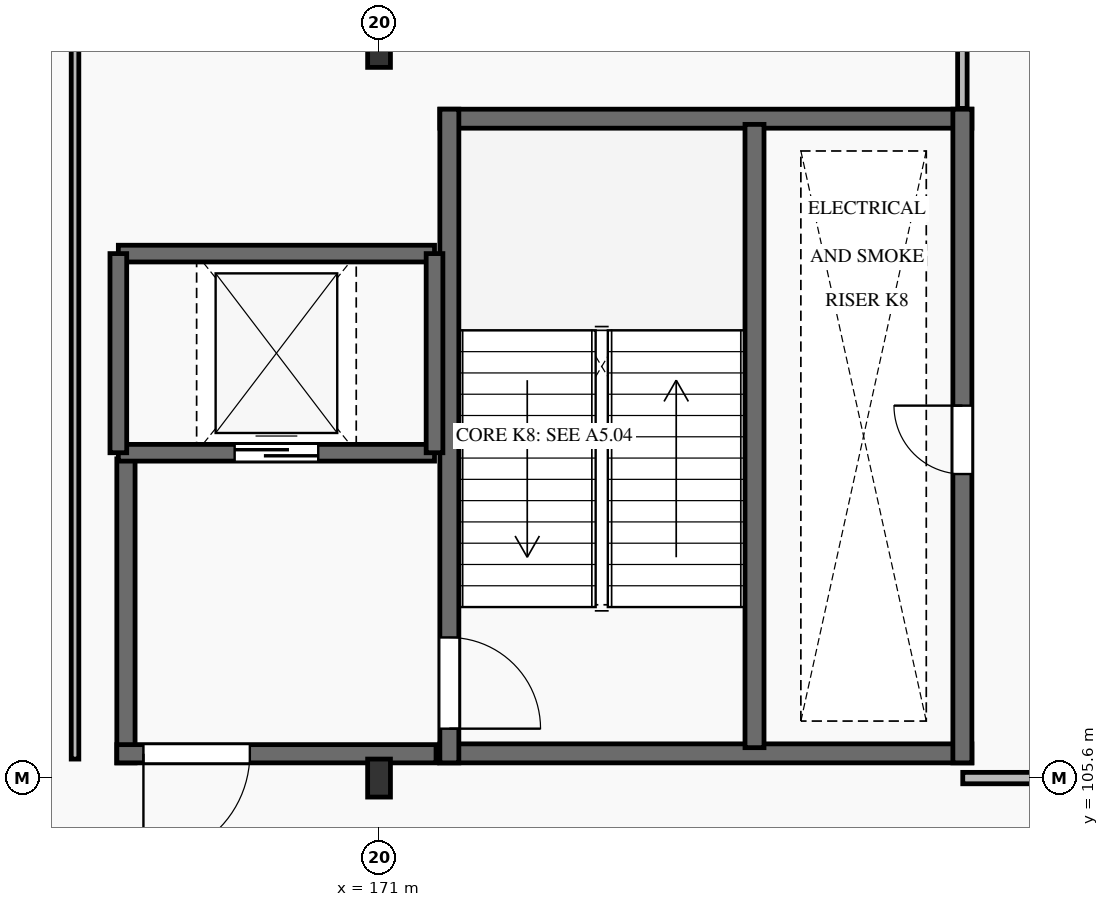
"""IFC4 building model, lengths in metres.
Left out: names, types, materials, properties, quantities, classifications, styles, units other than length and angle.
Written with IfcOpenShell. Run it as: python <this file> out.ifc"""

import sys

from ifc_helpers import new_model, si_unit, direction, frame, frame_2d, origin, origin_2d, place, context, subcontext, project, spatial, rectangle, i_section, extrude, element, fill, save


model = new_model("IFC4")
c1 = context("Model", 3, precision=1e-05, world=origin(), true_north=direction((0.0, 1.0)))
c2 = subcontext(c1, "Body", "Model", "MODEL_VIEW")
j1 = project(units=[si_unit("LENGTHUNIT", "METRE"), si_unit("PLANEANGLEUNIT", "RADIAN")], contexts=[c1])
p1 = place(None, origin())
s1 = spatial("IfcSite", under=j1, at=p1, CompositionType="ELEMENT")
p2 = place(p1, origin())
s2 = spatial("IfcBuilding", under=s1, at=p2, CompositionType="ELEMENT")
p3 = place(p2, frame((0.0, 0.0, 6.0)))
s3 = spatial("IfcBuildingStorey", under=s2, at=p3, CompositionType="ELEMENT", Elevation=6.0)
for number, where, z_axis, x_axis in (
    (1, (171.0, 105.6, 0.0), (0.0, 0.0, 1.0), (1.0, 0.0, 0.0)),
    (2, (171.0, 115.2, 0.0), (0.0, 0.0, 1.0), (1.0, 0.0, 0.0)),
):
    element("IfcColumn", number, at=place(p3, frame(where, z_axis=z_axis, x_axis=x_axis)), inside=s3, PredefinedType="COLUMN", context=c2, shape_type="SweptSolid", body=[
        extrude(i_section(OverallWidth=0.3, OverallDepth=0.5, WebThickness=0.014, FlangeThickness=0.028, FilletRadius=0.027, at=origin_2d()), origin(), (0.0, 0.0, 1.0), 4.8),
    ])
for number, where, z_axis, x_axis in (
    (3, (171.8, 105.925, 0.0), (0.0, 0.0, 1.0), (1.0, 0.0, 0.0)),
    (4, (171.8, 114.275, 0.0), (0.0, 0.0, 1.0), (1.0, 0.0, 0.0)),
):
    element("IfcWall", number, at=place(p3, frame(where, z_axis=z_axis, x_axis=x_axis)), inside=s3, PredefinedType="SHEAR", context=c2, shape_type="SweptSolid", body=[
        extrude(rectangle(XDim=7.0, YDim=0.25, at=frame_2d((3.5, 0.0))), origin(), (0.0, 0.0, 1.0), 4.8),
    ])
p4 = place(p3, frame((171.925, 105.8, 0.0), z_axis=(0.0, 0.0, 1.0), x_axis=(0.0, 1.0, 0.0)))
e5 = element("IfcWall", 5, at=p4, inside=s3, PredefinedType="SHEAR", context=c2, shape_type="SweptSolid", body=[
    extrude(rectangle(XDim=8.6, YDim=0.25, at=frame_2d((4.3, 0.0))), origin(), (0.0, 0.0, 1.0), 4.8),
])
p5 = place(p4, frame((0.45, 0.0, 0.0)))
e6 = element("IfcOpeningElement", 6, at=p5, cuts=e5, PredefinedType="OPENING", context=c2, shape_type="SweptSolid", body=[
    extrude(rectangle(XDim=1.2, YDim=2.15, at=frame_2d((0.6, 1.075))), frame((0.0, 0.14, 0.0), z_axis=(0.0, -1.0, 0.0), x_axis=(1.0, 0.0, 0.0)), (0.0, 0.0, 1.0), 0.28),
])
p6 = place(p3, frame((178.675, 105.8, 0.0), z_axis=(0.0, 0.0, 1.0), x_axis=(0.0, 1.0, 0.0)))
e7 = element("IfcWall", 7, at=p6, inside=s3, PredefinedType="SHEAR", context=c2, shape_type="SweptSolid", body=[
    extrude(rectangle(XDim=8.6, YDim=0.25, at=frame_2d((4.3, 0.0))), origin(), (0.0, 0.0, 1.0), 4.8),
])
p7 = place(p6, frame((3.8, 0.0, 0.0)))
e8 = element("IfcOpeningElement", 8, at=p7, cuts=e7, PredefinedType="OPENING", context=c2, shape_type="SweptSolid", body=[
    extrude(rectangle(XDim=0.9, YDim=2.05, at=frame_2d((0.45, 1.025))), frame((0.0, 0.14, 0.0), z_axis=(0.0, -1.0, 0.0), x_axis=(1.0, 0.0, 0.0)), (0.0, 0.0, 1.0), 0.28),
])
p8 = place(p3, frame((175.94, 106.0, 0.0), z_axis=(0.0, 0.0, 1.0), x_axis=(0.0, 1.0, 0.0)))
e9 = element("IfcWall", 9, at=p8, inside=s3, PredefinedType="SHEAR", context=c2, shape_type="SweptSolid", body=[
    extrude(rectangle(XDim=8.2, YDim=0.25, at=frame_2d((4.1, 0.0))), origin(), (0.0, 0.0, 1.0), 4.8),
])
p9 = place(p3, frame((167.67, 105.8, 0.0), z_axis=(0.0, 0.0, 1.0), x_axis=(0.0, 1.0, 0.0)))
e10 = element("IfcWall", 10, at=p9, inside=s3, PredefinedType="SHEAR", context=c2, shape_type="SweptSolid", body=[
    extrude(rectangle(XDim=4.0, YDim=0.24, at=frame_2d((2.0, 0.0))), origin(), (0.0, 0.0, 1.0), 4.8),
])
p10 = place(p3, frame((167.55, 105.92, 0.0), z_axis=(0.0, 0.0, 1.0), x_axis=(1.0, 0.0, 0.0)))
e11 = element("IfcWall", 11, at=p10, inside=s3, PredefinedType="SHEAR", context=c2, shape_type="SweptSolid", body=[
    extrude(rectangle(XDim=4.2, YDim=0.24, at=frame_2d((2.1, 0.0))), origin(), (0.0, 0.0, 1.0), 4.8),
])
p11 = place(p10, frame((0.35, 0.0, 0.0)))
e12 = element("IfcOpeningElement", 12, at=p11, cuts=e11, PredefinedType="OPENING", context=c2, shape_type="SweptSolid", body=[
    extrude(rectangle(XDim=1.4, YDim=2.2, at=frame_2d((0.7, 1.1))), frame((0.0, 0.135, 0.0), z_axis=(0.0, -1.0, 0.0), x_axis=(1.0, 0.0, 0.0)), (0.0, 0.0, 1.0), 0.27),
])
p12 = place(p3, frame((167.57, 109.88, 0.0), z_axis=(0.0, 0.0, 1.0), x_axis=(1.0, 0.0, 0.0)))
e13 = element("IfcWall", 13, at=p12, inside=s3, PredefinedType="SHEAR", context=c2, shape_type="SweptSolid", body=[
    extrude(rectangle(XDim=4.16, YDim=0.22, at=frame_2d((2.08, 0.0))), origin(), (0.0, 0.0, 1.0), 4.8),
])
p13 = place(p12, frame((1.53, 0.0, 0.0)))
e14 = element("IfcOpeningElement", 14, at=p13, cuts=e13, PredefinedType="OPENING", context=c2, shape_type="SweptSolid", body=[
    extrude(rectangle(XDim=1.1, YDim=2.15, at=frame_2d((0.55, 1.075))), frame((0.0, 0.125, 0.0), z_axis=(0.0, -1.0, 0.0), x_axis=(1.0, 0.0, 0.0)), (0.0, 0.0, 1.0), 0.25),
])
p14 = place(p3, frame((167.57, 112.5, 0.0), z_axis=(0.0, 0.0, 1.0), x_axis=(1.0, 0.0, 0.0)))
e15 = element("IfcWall", 15, at=p14, inside=s3, PredefinedType="SHEAR", context=c2, shape_type="SweptSolid", body=[
    extrude(rectangle(XDim=4.16, YDim=0.22, at=frame_2d((2.08, 0.0))), origin(), (0.0, 0.0, 1.0), 4.8),
])
for number, where, z_axis, x_axis in (
    (16, (167.57, 109.88, 0.0), (0.0, 0.0, 1.0), (0.0, 1.0, 0.0)),
    (17, (171.73, 109.88, 0.0), (0.0, 0.0, 1.0), (0.0, 1.0, 0.0)),
):
    element("IfcWall", number, at=place(p3, frame(where, z_axis=z_axis, x_axis=x_axis)), inside=s3, PredefinedType="SHEAR", context=c2, shape_type="SweptSolid", body=[
        extrude(rectangle(XDim=2.62, YDim=0.22, at=frame_2d((1.31, 0.0))), origin(), (0.0, 0.0, 1.0), 4.8),
    ])
p15 = place(p3, frame((178.68, 105.6, 0.0), z_axis=(0.0, 0.0, 1.0), x_axis=(1.0, 0.0, 0.0)))
e18 = element("IfcWall", 18, at=p15, inside=s3, PredefinedType="PARTITIONING", context=c2, shape_type="SweptSolid", body=[
    extrude(rectangle(XDim=10.165, YDim=0.15, at=frame_2d((5.083, 0.0))), origin(), (0.0, 0.0, 1.0), 4.23),
])
p16 = place(p15, frame((4.645, 0.0, 0.0)))
e19 = element("IfcOpeningElement", 19, at=p16, cuts=e18, PredefinedType="OPENING", context=c2, shape_type="SweptSolid", body=[
    extrude(rectangle(XDim=0.95, YDim=2.1, at=frame_2d((0.475, 1.05))), frame((0.0, 0.09, 0.0), z_axis=(0.0, -1.0, 0.0), x_axis=(1.0, 0.0, 0.0)), (0.0, 0.0, 1.0), 0.18),
])
p17 = place(p3, frame((167.0, 105.85, 0.0), z_axis=(0.0, 0.0, 1.0), x_axis=(0.0, 1.0, 0.0)))
e20 = element("IfcWall", 20, at=p17, inside=s3, PredefinedType="PARTITIONING", context=c2, shape_type="SweptSolid", body=[
    extrude(rectangle(XDim=18.565, YDim=0.1, at=frame_2d((9.282, 0.0))), origin(), (0.0, 0.0, 1.0), 4.53),
])
p18 = place(p3, frame((178.675, 114.41, 0.0), z_axis=(0.0, 0.0, 1.0), x_axis=(0.0, 1.0, 0.0)))
e21 = element("IfcWall", 21, at=p18, inside=s3, PredefinedType="PARTITIONING", context=c2, shape_type="SweptSolid", body=[
    extrude(rectangle(XDim=10.0, YDim=0.125, at=frame_2d((5.0, 0.0))), origin(), (0.0, 0.0, 1.0), 4.53),
])
p19 = place(p5, frame((1.2, 0.0, 0.0), z_axis=(0.0, 0.0, 1.0), x_axis=(-1.0, 0.0, 0.0)))
e22 = element("IfcDoor", 22, at=p19, inside=s3, OperationType="SINGLE_SWING_LEFT", PredefinedType="DOOR", context=c2, shape_type="SweptSolid", body=[
    extrude(rectangle(XDim=1.2, YDim=2.15, at=frame_2d((0.6, 1.075))), frame((0.0, 0.025, 0.0), z_axis=(0.0, -1.0, 0.0), x_axis=(1.0, 0.0, 0.0)), (0.0, 0.0, 1.0), 0.05),
])
fill(e6, e22)
p20 = place(p7, origin())
e23 = element("IfcDoor", 23, at=p20, inside=s3, OperationType="SINGLE_SWING_RIGHT", PredefinedType="DOOR", context=c2, shape_type="SweptSolid", body=[
    extrude(rectangle(XDim=0.9, YDim=2.05, at=frame_2d((0.45, 1.025))), frame((0.0, 0.025, 0.0), z_axis=(0.0, -1.0, 0.0), x_axis=(1.0, 0.0, 0.0)), (0.0, 0.0, 1.0), 0.05),
])
fill(e8, e23)
p21 = place(p11, frame((1.4, 0.0, 0.0), z_axis=(0.0, 0.0, 1.0), x_axis=(-1.0, 0.0, 0.0)))
e24 = element("IfcDoor", 24, at=p21, inside=s3, OperationType="SINGLE_SWING_LEFT", PredefinedType="DOOR", context=c2, shape_type="SweptSolid", body=[
    extrude(rectangle(XDim=1.4, YDim=2.2, at=frame_2d((0.7, 1.1))), frame((0.0, 0.025, 0.0), z_axis=(0.0, -1.0, 0.0), x_axis=(1.0, 0.0, 0.0)), (0.0, 0.0, 1.0), 0.05),
])
fill(e12, e24)
p22 = place(p13, origin())
e25 = element("IfcDoor", 25, at=p22, inside=s3, OperationType="SLIDING_TO_RIGHT", PredefinedType="DOOR", context=c2, shape_type="SweptSolid", body=[
    extrude(rectangle(XDim=1.1, YDim=2.15, at=frame_2d((0.55, 1.075))), frame((0.0, 0.025, 0.0), z_axis=(0.0, -1.0, 0.0), x_axis=(1.0, 0.0, 0.0)), (0.0, 0.0, 1.0), 0.05),
])
fill(e14, e25)
save(model, sys.argv[1])
